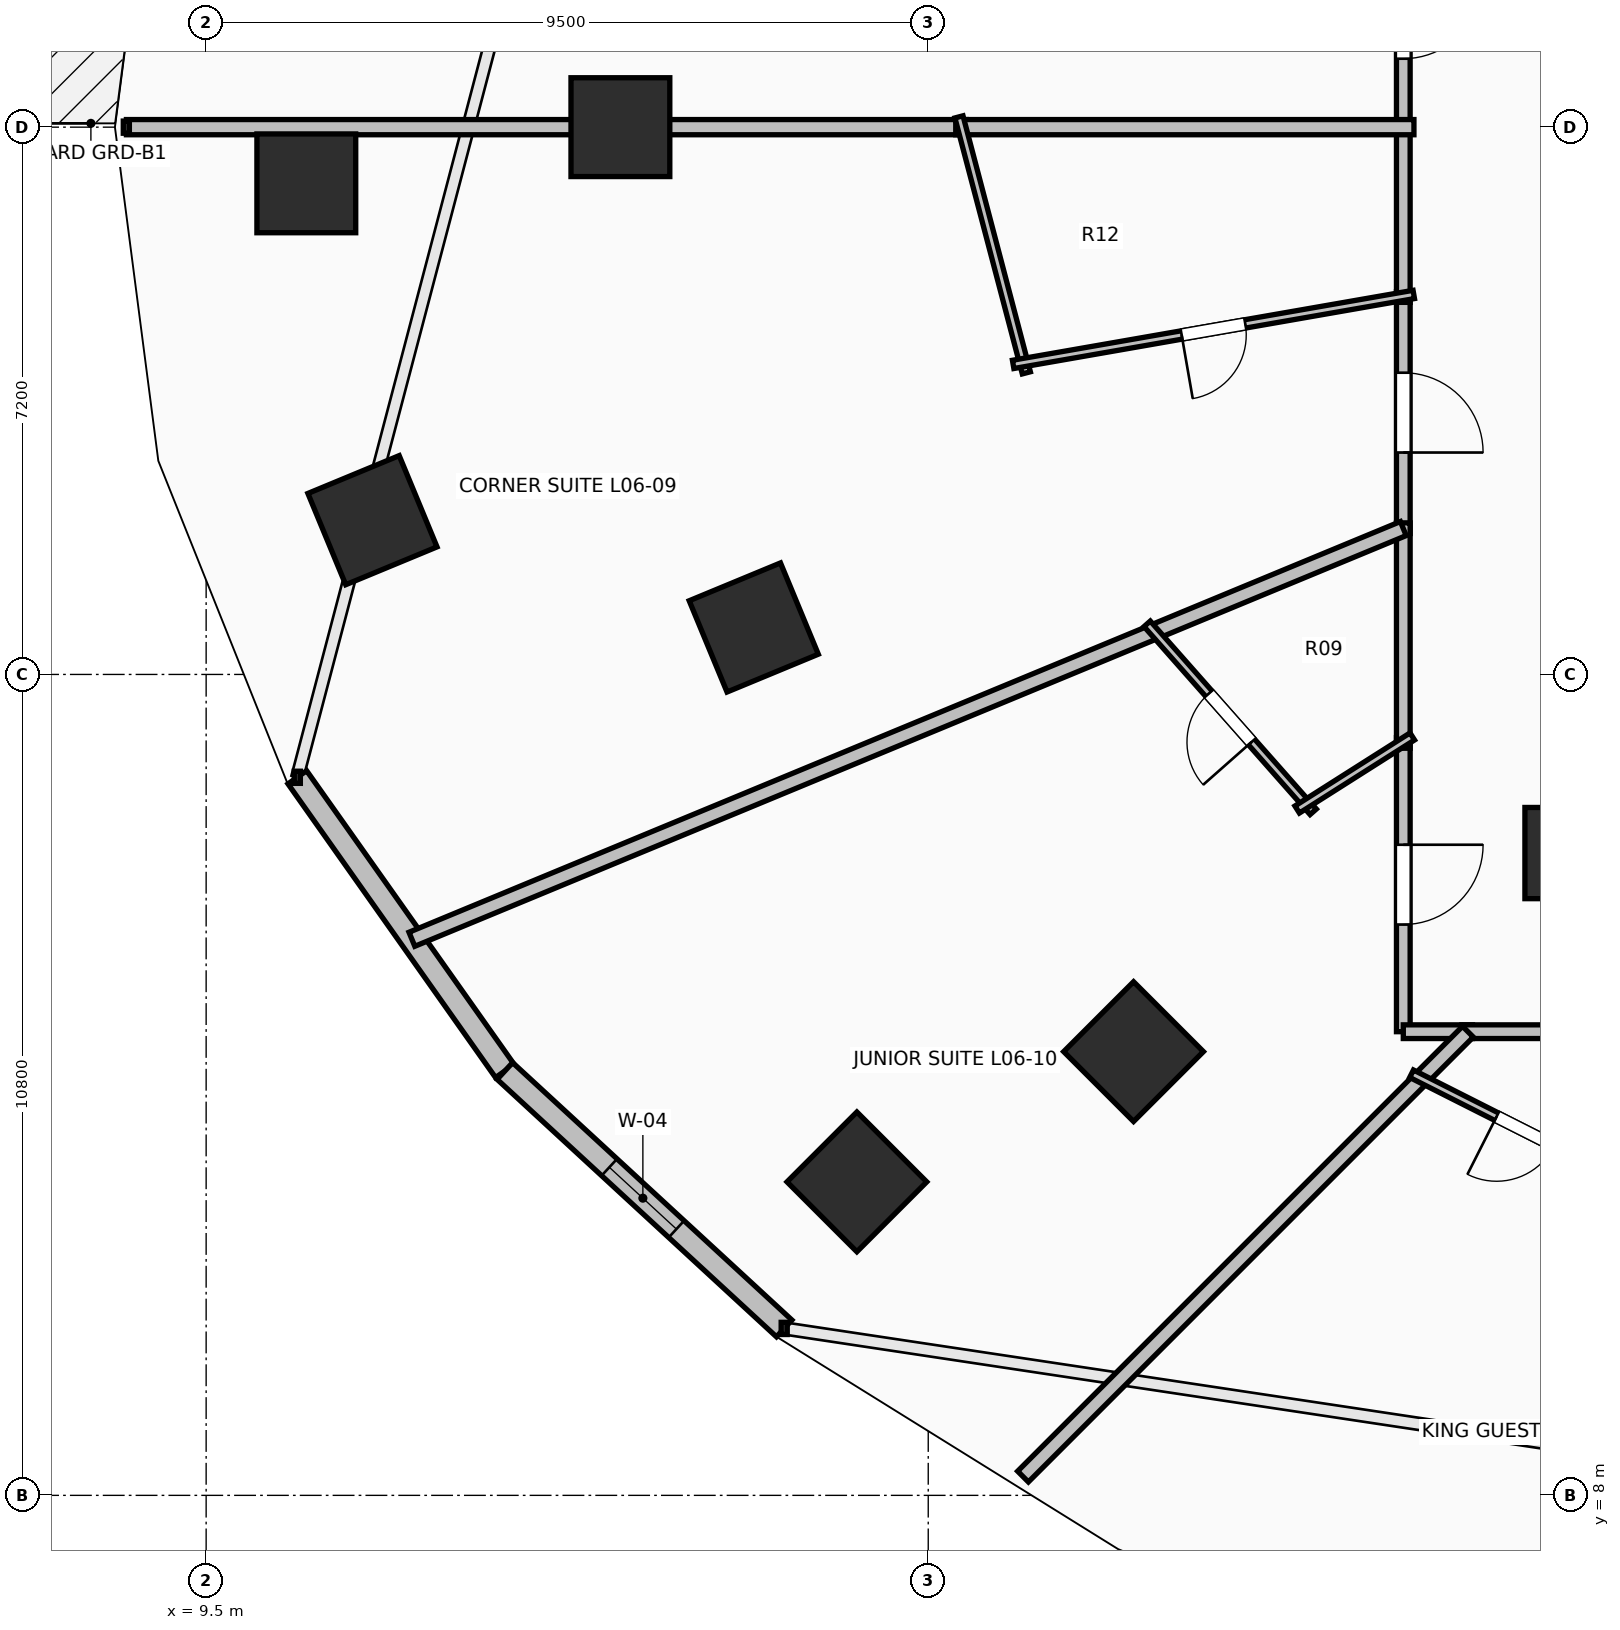
"""IFC4 building model, lengths in metres.
Left out: names, types, materials, properties, quantities, classifications, styles, units other than length and angle.
Written with IfcOpenShell. Run it as: python <this file> out.ifc"""

import sys

from ifc_helpers import new_model, si_unit, direction, frame, frame_2d, origin, origin_2d, place, context, subcontext, project, spatial, rectangle, extrude, element, fill, save


model = new_model("IFC4")
c1 = context("Model", 3, precision=1e-05, world=origin(), true_north=direction((0.0, 1.0)))
c2 = subcontext(c1, "Body", "Model", "MODEL_VIEW")
j1 = project(units=[si_unit("LENGTHUNIT", "METRE"), si_unit("PLANEANGLEUNIT", "RADIAN")], contexts=[c1])
p1 = place(None, origin())
s1 = spatial("IfcSite", under=j1, at=p1, CompositionType="ELEMENT")
p2 = place(p1, origin())
s2 = spatial("IfcBuilding", under=s1, at=p2, CompositionType="ELEMENT")
p3 = place(p2, frame((0.0, 0.0, 27.5)))
s3 = spatial("IfcBuildingStorey", under=s2, at=p3, CompositionType="ELEMENT", Elevation=27.5)
for number, where, z_axis, x_axis in (
    (1, (14.95, 26.0, 0.0), (0.0, 0.0, 1.0), (-1.0, 0.0, 0.0)),
    (2, (16.705, 19.418, 0.0), (0.0, 0.0, 1.0), (-0.924, -0.383, 0.0)),
    (3, (21.701, 13.838, 0.0), (0.0, 0.0, 1.0), (-0.707, -0.707, 0.0)),
    (4, (10.818, 25.261, 0.0), (0.0, 0.0, 1.0), (-1.0, 0.0, 0.0)),
    (5, (11.688, 20.83, 0.0), (0.0, 0.0, 1.0), (-0.924, -0.383, 0.0)),
    (6, (18.061, 12.124, 0.0), (0.0, 0.0, 1.0), (-0.707, -0.707, 0.0)),
):
    element("IfcColumn", number, at=place(p3, frame(where, z_axis=z_axis, x_axis=x_axis)), inside=s3, PredefinedType="COLUMN", context=c2, shape_type="SweptSolid", body=[
        extrude(rectangle(XDim=1.3, YDim=1.3, at=origin_2d()), origin(), (0.0, 0.0, 1.0), 3.5),
    ])
p4 = place(p3, frame((27.25, 16.45, 0.0), z_axis=(0.0, 0.0, 1.0), x_axis=(1.0, 0.0, 0.0)))
e7 = element("IfcColumn", 7, at=p4, inside=s3, PredefinedType="PILASTER", context=c2, shape_type="SweptSolid", body=[
    extrude(rectangle(XDim=0.8, YDim=1.2, at=origin_2d()), origin(), (0.0, 0.0, 1.0), 3.5),
])
p5 = place(p3, frame((10.699, 17.447, 0.0), z_axis=(0.0, 0.0, 1.0), x_axis=(0.577130815624, -0.816651713803, 0.0)))
e8 = element("IfcWall", 8, at=p5, inside=s3, PredefinedType="STANDARD", context=c2, shape_type="SweptSolid", body=[
    extrude(rectangle(XDim=4.731, YDim=0.3, at=frame_2d((2.366, 0.0))), origin(), (0.0, 0.0, 1.0), 3.24),
])
p6 = place(p3, frame((13.43, 13.583, 0.0), z_axis=(0.0, 0.0, 1.0), x_axis=(0.735342629635, -0.677695519419, 0.0)))
e9 = element("IfcWall", 9, at=p6, inside=s3, PredefinedType="STANDARD", context=c2, shape_type="SweptSolid", body=[
    extrude(rectangle(XDim=4.997, YDim=0.3, at=frame_2d((2.499, 0.0))), origin(), (0.0, 0.0, 1.0), 3.24),
])
p7 = place(p6, frame((1.869, 0.0, 0.85)))
e10 = element("IfcOpeningElement", 10, at=p7, cuts=e9, PredefinedType="OPENING", context=c2, shape_type="SweptSolid", body=[
    extrude(rectangle(XDim=1.2, YDim=1.95, at=frame_2d((0.6, 0.975))), frame((0.0, 0.165, 0.0), z_axis=(0.0, -1.0, 0.0), x_axis=(1.0, 0.0, 0.0)), (0.0, 0.0, 1.0), 0.33),
])
p8 = place(p3, frame((25.25, 28.911, 0.0), z_axis=(0.0, 0.0, 1.0), x_axis=(0.0, -1.0, 0.0)))
e11 = element("IfcWall", 11, at=p8, inside=s3, PredefinedType="PARTITIONING", context=c2, shape_type="SweptSolid", body=[
    extrude(rectangle(XDim=2.971, YDim=0.18, at=frame_2d((1.485, 0.0))), origin(), (0.0, 0.0, 1.0), 2.432),
])
p9 = place(p8, frame((0.96, 0.0, 0.0)))
e12 = element("IfcOpeningElement", 12, at=p9, cuts=e11, PredefinedType="OPENING", context=c2, shape_type="SweptSolid", body=[
    extrude(rectangle(XDim=1.05, YDim=2.2, at=frame_2d((0.525, 1.1))), frame((0.0, 0.105, 0.0), z_axis=(0.0, -1.0, 0.0), x_axis=(1.0, 0.0, 0.0)), (0.0, 0.0, 1.0), 0.21),
])
p10 = place(p3, frame((25.25, 23.835, 0.0), z_axis=(0.0, 0.0, 1.0), x_axis=(0.0, -1.0, 0.0)))
e13 = element("IfcWall", 13, at=p10, inside=s3, PredefinedType="PARTITIONING", context=c2, shape_type="SweptSolid", body=[
    extrude(rectangle(XDim=3.181, YDim=0.18, at=frame_2d((1.59, 0.0))), origin(), (0.0, 0.0, 1.0), 3.24),
])
p11 = place(p10, frame((1.065, 0.0, 0.0)))
e14 = element("IfcOpeningElement", 14, at=p11, cuts=e13, PredefinedType="OPENING", context=c2, shape_type="SweptSolid", body=[
    extrude(rectangle(XDim=1.05, YDim=2.2, at=frame_2d((0.525, 1.1))), frame((0.0, 0.105, 0.0), z_axis=(0.0, -1.0, 0.0), x_axis=(1.0, 0.0, 0.0)), (0.0, 0.0, 1.0), 0.21),
])
p12 = place(p3, frame((25.25, 26.08, 0.0), z_axis=(0.0, 0.0, 1.0), x_axis=(0.0, -1.0, 0.0)))
e15 = element("IfcWall", 15, at=p12, inside=s3, PredefinedType="PARTITIONING", context=c2, shape_type="SweptSolid", body=[
    extrude(rectangle(XDim=2.385, YDim=0.18, at=frame_2d((1.192, 0.0))), origin(), (0.0, 0.0, 1.0), 3.24),
])
p13 = place(p3, frame((25.25, 17.969, 0.0), z_axis=(0.0, 0.0, 1.0), x_axis=(0.0, -1.0, 0.0)))
e16 = element("IfcWall", 16, at=p13, inside=s3, PredefinedType="PARTITIONING", context=c2, shape_type="SweptSolid", body=[
    extrude(rectangle(XDim=3.869, YDim=0.18, at=frame_2d((1.935, 0.0))), origin(), (0.0, 0.0, 1.0), 2.432),
])
p14 = place(p13, frame((1.409, 0.0, 0.0)))
e17 = element("IfcOpeningElement", 17, at=p14, cuts=e16, PredefinedType="OPENING", context=c2, shape_type="SweptSolid", body=[
    extrude(rectangle(XDim=1.05, YDim=2.2, at=frame_2d((0.525, 1.1))), frame((0.0, 0.105, 0.0), z_axis=(0.0, -1.0, 0.0), x_axis=(1.0, 0.0, 0.0)), (0.0, 0.0, 1.0), 0.21),
])
p15 = place(p3, frame((25.25, 14.1, 0.0), z_axis=(0.0, 0.0, 1.0), x_axis=(1.0, 0.0, 0.0)))
e18 = element("IfcWall", 18, at=p15, inside=s3, PredefinedType="PARTITIONING", context=c2, shape_type="SweptSolid", body=[
    extrude(rectangle(XDim=0.91, YDim=0.18, at=frame_2d((0.455, 0.0))), origin(), (0.0, 0.0, 1.0), 3.24),
])
p16 = place(p3, frame((25.25, 20.794, 0.0), z_axis=(0.0, 0.0, 1.0), x_axis=(0.0, -1.0, 0.0)))
e19 = element("IfcWall", 19, at=p16, inside=s3, PredefinedType="PARTITIONING", context=c2, shape_type="SweptSolid", body=[
    extrude(rectangle(XDim=2.965, YDim=0.18, at=frame_2d((1.482, 0.0))), origin(), (0.0, 0.0, 1.0), 3.24),
])
p17 = place(p3, frame((26.02, 14.1, 0.0), z_axis=(0.0, 0.0, 1.0), x_axis=(1.0, 0.0, 0.0)))
e20 = element("IfcWall", 20, at=p17, inside=s3, PredefinedType="PARTITIONING", context=c2, shape_type="SweptSolid", body=[
    extrude(rectangle(XDim=3.684, YDim=0.18, at=frame_2d((1.842, 0.0))), origin(), (0.0, 0.0, 1.0), 2.432),
])
p18 = place(p3, frame((8.451, 26.0, 0.0), z_axis=(0.0, 0.0, 1.0), x_axis=(1.0, 0.0, 0.0)))
e21 = element("IfcWall", 21, at=p18, inside=s3, PredefinedType="PARTITIONING", context=c2, shape_type="SweptSolid", body=[
    extrude(rectangle(XDim=11.051, YDim=0.2, at=frame_2d((5.525, 0.0))), origin(), (0.0, 0.0, 1.0), 2.432),
])
p19 = place(p3, frame((19.362, 26.0, 0.0), z_axis=(0.0, 0.0, 1.0), x_axis=(1.0, 0.0, 0.0)))
e22 = element("IfcWall", 22, at=p19, inside=s3, PredefinedType="PARTITIONING", context=c2, shape_type="SweptSolid", body=[
    extrude(rectangle(XDim=6.028, YDim=0.2, at=frame_2d((3.014, 0.0))), origin(), (0.0, 0.0, 1.0), 2.922),
])
p20 = place(p3, frame((20.291, 22.768, 0.0), z_axis=(0.0, 0.0, 1.0), x_axis=(-0.254476045764, 0.967079077497, 0.0)))
e23 = element("IfcWall", 23, at=p20, inside=s3, PredefinedType="PARTITIONING", context=c2, shape_type="SweptSolid", body=[
    extrude(rectangle(XDim=3.483, YDim=0.11, at=frame_2d((1.741, 0.0))), origin(), (0.0, 0.0, 1.0), 3.24),
])
p21 = place(p3, frame((25.388, 23.799, 0.0), z_axis=(0.0, 0.0, 1.0), x_axis=(-0.985100697644, -0.171978532096, 0.0)))
e24 = element("IfcWall", 24, at=p21, inside=s3, PredefinedType="PARTITIONING", context=c2, shape_type="SweptSolid", body=[
    extrude(rectangle(XDim=5.351, YDim=0.11, at=frame_2d((2.675, 0.0))), origin(), (0.0, 0.0, 1.0), 2.922),
])
p22 = place(p21, frame((2.25, 0.0, 0.0)))
e25 = element("IfcOpeningElement", 25, at=p22, cuts=e24, PredefinedType="OPENING", context=c2, shape_type="SweptSolid", body=[
    extrude(rectangle(XDim=0.85, YDim=2.1, at=frame_2d((0.425, 1.05))), frame((0.0, 0.07, 0.0), z_axis=(0.0, -1.0, 0.0), x_axis=(1.0, 0.0, 0.0)), (0.0, 0.0, 1.0), 0.14),
])
p23 = place(p3, frame((12.207, 15.316, 0.0), z_axis=(0.0, 0.0, 1.0), x_axis=(0.923866969846, 0.382713759914, 0.0)))
e26 = element("IfcWall", 26, at=p23, inside=s3, PredefinedType="PARTITIONING", context=c2, shape_type="SweptSolid", body=[
    extrude(rectangle(XDim=14.118, YDim=0.2, at=frame_2d((7.059, 0.0))), origin(), (0.0, 0.0, 1.0), 2.432),
])
p24 = place(p3, frame((24.065, 16.993, 0.0), z_axis=(0.0, 0.0, 1.0), x_axis=(-0.662059609276, 0.749451181709, 0.0)))
e27 = element("IfcWall", 27, at=p24, inside=s3, PredefinedType="PARTITIONING", context=c2, shape_type="SweptSolid", body=[
    extrude(rectangle(XDim=3.299, YDim=0.11, at=frame_2d((1.65, 0.0))), origin(), (0.0, 0.0, 1.0), 2.432),
])
p25 = place(p24, frame((1.225, 0.0, 0.0)))
e28 = element("IfcOpeningElement", 28, at=p25, cuts=e27, PredefinedType="OPENING", context=c2, shape_type="SweptSolid", body=[
    extrude(rectangle(XDim=0.85, YDim=2.1, at=frame_2d((0.425, 1.05))), frame((0.0, 0.07, 0.0), z_axis=(0.0, -1.0, 0.0), x_axis=(1.0, 0.0, 0.0)), (0.0, 0.0, 1.0), 0.14),
])
p26 = place(p3, frame((25.368, 17.984, 0.0), z_axis=(0.0, 0.0, 1.0), x_axis=(-0.844361394482, -0.535774052665, 0.0)))
e29 = element("IfcWall", 29, at=p26, inside=s3, PredefinedType="PARTITIONING", context=c2, shape_type="SweptSolid", body=[
    extrude(rectangle(XDim=1.793, YDim=0.11, at=frame_2d((0.897, 0.0))), origin(), (0.0, 0.0, 1.0), 2.432),
])
p27 = place(p3, frame((20.247, 8.247, 0.0), z_axis=(0.0, 0.0, 1.0), x_axis=(0.707106781187, 0.707106781187, 0.0)))
e30 = element("IfcWall", 30, at=p27, inside=s3, PredefinedType="PARTITIONING", context=c2, shape_type="SweptSolid", body=[
    extrude(rectangle(XDim=8.277, YDim=0.2, at=frame_2d((4.139, 0.0))), origin(), (0.0, 0.0, 1.0), 2.624),
])
p28 = place(p3, frame((28.354, 12.034, 0.0), z_axis=(0.0, 0.0, 1.0), x_axis=(-0.892556909034, 0.450934767052, 0.0)))
e31 = element("IfcWall", 31, at=p28, inside=s3, PredefinedType="PARTITIONING", context=c2, shape_type="SweptSolid", body=[
    extrude(rectangle(XDim=3.356, YDim=0.11, at=frame_2d((1.678, 0.0))), origin(), (0.0, 0.0, 1.0), 2.432),
])
p29 = place(p28, frame((1.253, 0.0, 0.0)))
e32 = element("IfcOpeningElement", 32, at=p29, cuts=e31, PredefinedType="OPENING", context=c2, shape_type="SweptSolid", body=[
    extrude(rectangle(XDim=0.85, YDim=2.1, at=frame_2d((0.425, 1.05))), frame((0.0, 0.07, 0.0), z_axis=(0.0, -1.0, 0.0), x_axis=(1.0, 0.0, 0.0)), (0.0, 0.0, 1.0), 0.14),
])
p30 = place(p7, origin())
e33 = element("IfcWindow", 33, at=p30, inside=s3, PartitioningType="SINGLE_PANEL", PredefinedType="WINDOW", context=c2, shape_type="SweptSolid", body=[
    extrude(rectangle(XDim=1.2, YDim=1.95, at=frame_2d((0.6, 0.975))), frame((0.0, 0.03, 0.0), z_axis=(0.0, -1.0, 0.0), x_axis=(1.0, 0.0, 0.0)), (0.0, 0.0, 1.0), 0.06),
])
fill(e10, e33)
p31 = place(p9, origin())
e34 = element("IfcDoor", 34, at=p31, inside=s3, OperationType="SINGLE_SWING_LEFT", PredefinedType="DOOR", context=c2, shape_type="SweptSolid", body=[
    extrude(rectangle(XDim=1.05, YDim=2.2, at=frame_2d((0.525, 1.1))), frame((0.0, 0.025, 0.0), z_axis=(0.0, -1.0, 0.0), x_axis=(1.0, 0.0, 0.0)), (0.0, 0.0, 1.0), 0.05),
])
fill(e12, e34)
p32 = place(p11, origin())
e35 = element("IfcDoor", 35, at=p32, inside=s3, OperationType="SINGLE_SWING_RIGHT", PredefinedType="DOOR", context=c2, shape_type="SweptSolid", body=[
    extrude(rectangle(XDim=1.05, YDim=2.2, at=frame_2d((0.525, 1.1))), frame((0.0, 0.025, 0.0), z_axis=(0.0, -1.0, 0.0), x_axis=(1.0, 0.0, 0.0)), (0.0, 0.0, 1.0), 0.05),
])
fill(e14, e35)
p33 = place(p14, origin())
e36 = element("IfcDoor", 36, at=p33, inside=s3, OperationType="SINGLE_SWING_LEFT", PredefinedType="DOOR", context=c2, shape_type="SweptSolid", body=[
    extrude(rectangle(XDim=1.05, YDim=2.2, at=frame_2d((0.525, 1.1))), frame((0.0, 0.025, 0.0), z_axis=(0.0, -1.0, 0.0), x_axis=(1.0, 0.0, 0.0)), (0.0, 0.0, 1.0), 0.05),
])
fill(e17, e36)
p34 = place(p22, origin())
e37 = element("IfcDoor", 37, at=p34, inside=s3, OperationType="SINGLE_SWING_RIGHT", PredefinedType="DOOR", context=c2, shape_type="SweptSolid", body=[
    extrude(rectangle(XDim=0.85, YDim=2.1, at=frame_2d((0.425, 1.05))), frame((0.0, 0.025, 0.0), z_axis=(0.0, -1.0, 0.0), x_axis=(1.0, 0.0, 0.0)), (0.0, 0.0, 1.0), 0.05),
])
fill(e25, e37)
p35 = place(p25, origin())
e38 = element("IfcDoor", 38, at=p35, inside=s3, OperationType="SINGLE_SWING_LEFT", PredefinedType="DOOR", context=c2, shape_type="SweptSolid", body=[
    extrude(rectangle(XDim=0.85, YDim=2.1, at=frame_2d((0.425, 1.05))), frame((0.0, 0.025, 0.0), z_axis=(0.0, -1.0, 0.0), x_axis=(1.0, 0.0, 0.0)), (0.0, 0.0, 1.0), 0.05),
])
fill(e28, e38)
p36 = place(p29, origin())
e39 = element("IfcDoor", 39, at=p36, inside=s3, OperationType="SINGLE_SWING_RIGHT", PredefinedType="DOOR", context=c2, shape_type="SweptSolid", body=[
    extrude(rectangle(XDim=0.85, YDim=2.1, at=frame_2d((0.425, 1.05))), frame((0.0, 0.025, 0.0), z_axis=(0.0, -1.0, 0.0), x_axis=(1.0, 0.0, 0.0)), (0.0, 0.0, 1.0), 0.05),
])
fill(e32, e39)
save(model, sys.argv[1])
